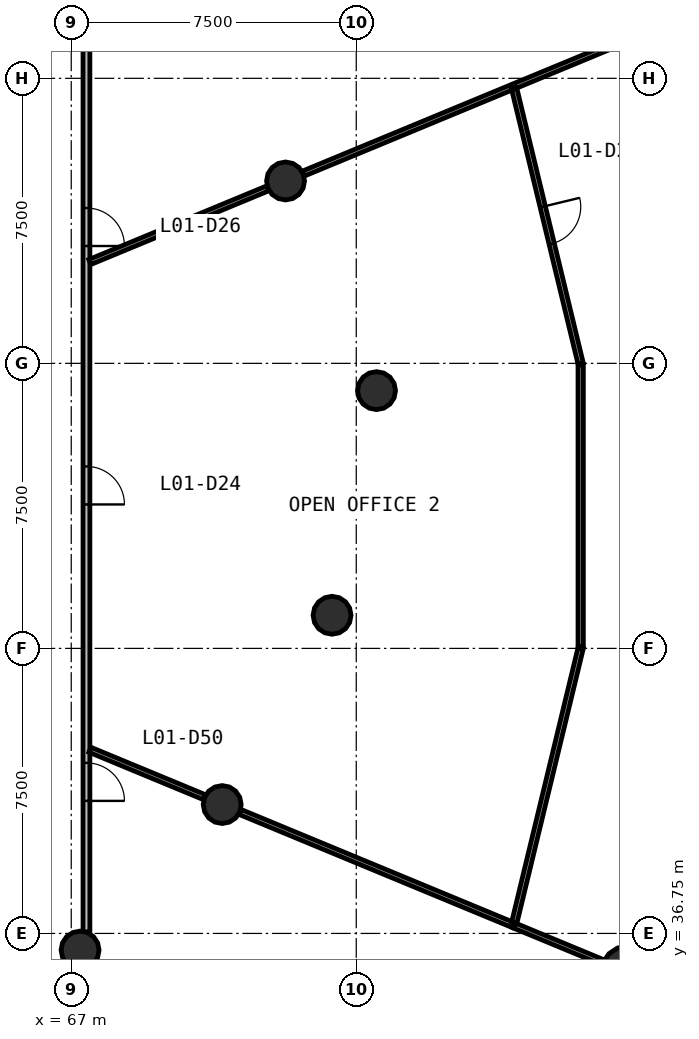
"""IFC4 building model, lengths in metres.
Left out: names, types, materials, properties, quantities, classifications, styles, units other than length and angle.
Written with IfcOpenShell. Run it as: python <this file> out.ifc"""

import sys

from ifc_helpers import new_model, si_unit, direction, frame, frame_2d, origin, origin_2d, place, context, subcontext, project, spatial, rectangle, circle, extrude, source, transform, mapped, element, fill, save


model = new_model("IFC4")
c1 = context("Model", 3, precision=1e-05, world=origin(), true_north=direction((0.0, 1.0)))
c2 = subcontext(c1, "Body", "Model", "MODEL_VIEW")
j1 = project(units=[si_unit("LENGTHUNIT", "METRE"), si_unit("PLANEANGLEUNIT", "RADIAN")], contexts=[c1])
p1 = place(None, origin())
s1 = spatial("IfcSite", under=j1, at=p1, CompositionType="ELEMENT")
p2 = place(p1, origin())
s2 = spatial("IfcBuilding", under=s1, at=p2, CompositionType="ELEMENT")
p3 = place(p2, frame((0.0, 0.0, 5.0)))
s3 = spatial("IfcBuildingStorey", under=s2, at=p3, CompositionType="ELEMENT", Elevation=5.0)
m1 = source(origin(), c2, "Body", "SweptSolid", [
    extrude(circle(Radius=0.7, at=origin_2d()), origin(), (0.0, 0.0, 1.0), 4.4),
])
p4 = place(p3, frame((81.645, 35.721, 0.0), z_axis=(0.0, 0.0, 1.0), x_axis=(1.0, 0.0, 0.0)))
e1 = element("IfcColumn", 1, at=p4, inside=s3, PredefinedType="COLUMN", context=c2, shape_type="MappedRepresentation", body=[
    mapped(m1, transform((0.0, 0.0, 0.0), scale=1.0)),
])
m2 = source(origin(), c2, "Body", "SweptSolid", [
    extrude(circle(Radius=0.5, at=origin_2d()), origin(), (0.0, 0.0, 1.0), 4.4),
])
for number, where, z_axis, x_axis in (
    (2, (75.034, 51.032, 0.0), (0.0, 0.0, 1.0), (1.0, 0.0, 0.0)),
    (3, (72.639, 56.549, 0.0), (0.0, 0.0, 1.0), (1.0, 0.0, 0.0)),
    (4, (67.232, 36.312, 0.0), (0.0, 0.0, 1.0), (1.0, 0.0, 0.0)),
    (5, (70.972, 40.141, 0.0), (0.0, 0.0, 1.0), (1.0, 0.0, 0.0)),
    (6, (73.863, 45.122, 0.0), (0.0, 0.0, 1.0), (1.0, 0.0, 0.0)),
):
    element("IfcColumn", number, at=place(p3, frame(where, z_axis=z_axis, x_axis=x_axis)), inside=s3, PredefinedType="COLUMN", context=c2, shape_type="MappedRepresentation", body=[
        mapped(m2, transform((0.0, 0.0, 0.0), scale=1.0)),
    ])
p5 = place(p3, frame((67.4, 60.37, 0.0), z_axis=(0.0, 0.0, 1.0), x_axis=(0.0, -1.0, 0.0)))
e7 = element("IfcWall", 7, at=p5, inside=s3, PredefinedType="PARTITIONING", context=c2, shape_type="SweptSolid", body=[
    extrude(rectangle(XDim=23.583, YDim=0.18, at=frame_2d((11.791, 0.0))), origin(), (0.0, 0.0, 1.0), 3.25),
])
p6 = place(p5, frame((11.333, 0.0, 0.0)))
e8 = element("IfcOpeningElement", 8, at=p6, cuts=e7, PredefinedType="OPENING", context=c2, shape_type="SweptSolid", body=[
    extrude(rectangle(XDim=1.0, YDim=2.1, at=frame_2d((0.5, 1.05))), frame((0.0, 0.1, 0.0), z_axis=(0.0, -1.0, 0.0), x_axis=(1.0, 0.0, 0.0)), (0.0, 0.0, 1.0), 0.2),
])
p7 = place(p5, frame((4.532, 0.0, 0.0)))
e9 = element("IfcOpeningElement", 9, at=p7, cuts=e7, PredefinedType="OPENING", context=c2, shape_type="SweptSolid", body=[
    extrude(rectangle(XDim=1.0, YDim=2.1, at=frame_2d((0.5, 1.05))), frame((0.0, 0.1, 0.0), z_axis=(0.0, -1.0, 0.0), x_axis=(1.0, 0.0, 0.0)), (0.0, 0.0, 1.0), 0.2),
])
p8 = place(p5, frame((19.133, 0.0, 0.0)))
e10 = element("IfcOpeningElement", 10, at=p8, cuts=e7, PredefinedType="OPENING", context=c2, shape_type="SweptSolid", body=[
    extrude(rectangle(XDim=1.0, YDim=2.1, at=frame_2d((0.5, 1.05))), frame((0.0, 0.1, 0.0), z_axis=(0.0, -1.0, 0.0), x_axis=(1.0, 0.0, 0.0)), (0.0, 0.0, 1.0), 0.2),
])
p9 = place(p3, frame((71.439, 39.948, 0.0), z_axis=(0.0, 0.0, 1.0), x_axis=(0.923876369205, -0.382691069173, 0.0)))
e11 = element("IfcWall", 11, at=p9, inside=s3, PredefinedType="PARTITIONING", context=c2, shape_type="SweptSolid", body=[
    extrude(rectangle(XDim=7.796, YDim=0.14, at=frame_2d((3.898, 0.0))), origin(), (0.0, 0.0, 1.0), 3.25),
])
p10 = place(p3, frame((78.642, 59.035, 0.0), z_axis=(0.0, 0.0, 1.0), x_axis=(0.235066566732, -0.971979274061, 0.0)))
e12 = element("IfcWall", 12, at=p10, inside=s3, PredefinedType="PARTITIONING", context=c2, shape_type="SweptSolid", body=[
    extrude(rectangle(XDim=7.506, YDim=0.14, at=frame_2d((3.753, 0.0))), origin(), (0.0, 0.0, 1.0), 3.25),
])
p11 = place(p10, frame((3.256, 0.0, 0.0)))
e13 = element("IfcOpeningElement", 13, at=p11, cuts=e12, PredefinedType="OPENING", context=c2, shape_type="SweptSolid", body=[
    extrude(rectangle(XDim=1.0, YDim=2.1, at=frame_2d((0.5, 1.05))), frame((0.0, 0.08, 0.0), z_axis=(0.0, -1.0, 0.0), x_axis=(1.0, 0.0, 0.0)), (0.0, 0.0, 1.0), 0.16),
])
p12 = place(p3, frame((78.658, 37.034, 0.0), z_axis=(0.0, 0.0, 1.0), x_axis=(0.235080266969, 0.97197596065, 0.0)))
e14 = element("IfcWall", 14, at=p12, inside=s3, PredefinedType="PARTITIONING", context=c2, shape_type="SweptSolid", body=[
    extrude(rectangle(XDim=7.435, YDim=0.14, at=frame_2d((3.717, 0.0))), origin(), (0.0, 0.0, 1.0), 3.25),
])
p13 = place(p3, frame((80.406, 44.29, 0.0), z_axis=(0.0, 0.0, 1.0), x_axis=(0.0, 1.0, 0.0)))
e15 = element("IfcWall", 15, at=p13, inside=s3, PredefinedType="PARTITIONING", context=c2, shape_type="SweptSolid", body=[
    extrude(rectangle(XDim=7.419, YDim=0.14, at=frame_2d((3.71, 0.0))), origin(), (0.0, 0.0, 1.0), 3.25),
])
p14 = place(p3, frame((73.106, 56.742, 0.0), z_axis=(0.0, 0.0, 1.0), x_axis=(0.923863045068, 0.382723234148, 0.0)))
e16 = element("IfcWall", 16, at=p14, inside=s3, PredefinedType="PARTITIONING", context=c2, shape_type="SweptSolid", body=[
    extrude(rectangle(XDim=5.921, YDim=0.14, at=frame_2d((2.96, 0.0))), origin(), (0.0, 0.0, 1.0), 3.25),
])
p15 = place(p3, frame((78.669, 59.047, 0.0), z_axis=(0.0, 0.0, 1.0), x_axis=(0.923891330959, 0.382654947151, 0.0)))
e17 = element("IfcWall", 17, at=p15, inside=s3, PredefinedType="PARTITIONING", context=c2, shape_type="SweptSolid", body=[
    extrude(rectangle(XDim=5.334, YDim=0.14, at=frame_2d((2.667, 0.0))), origin(), (0.0, 0.0, 1.0), 3.25),
])
p16 = place(p3, frame((67.49, 54.416, 0.0), z_axis=(0.0, 0.0, 1.0), x_axis=(0.923890025086, 0.382658100067, 0.0)))
e18 = element("IfcWall", 18, at=p16, inside=s3, PredefinedType="PARTITIONING", context=c2, shape_type="SweptSolid", body=[
    extrude(rectangle(XDim=5.068, YDim=0.14, at=frame_2d((2.534, 0.0))), origin(), (0.0, 0.0, 1.0), 3.25),
])
p17 = place(p3, frame((67.49, 41.584, 0.0), z_axis=(0.0, 0.0, 1.0), x_axis=(0.923911109142, -0.382607190737, 0.0)))
e19 = element("IfcWall", 19, at=p17, inside=s3, PredefinedType="PARTITIONING", context=c2, shape_type="SweptSolid", body=[
    extrude(rectangle(XDim=3.264, YDim=0.14, at=frame_2d((1.632, 0.0))), origin(), (0.0, 0.0, 1.0), 3.25),
])
p18 = place(p3, frame((78.669, 36.953, 0.0), z_axis=(0.0, 0.0, 1.0), x_axis=(0.923876063287, -0.382691807705, 0.0)))
e20 = element("IfcWall", 20, at=p18, inside=s3, PredefinedType="PARTITIONING", context=c2, shape_type="SweptSolid", body=[
    extrude(rectangle(XDim=2.515, YDim=0.14, at=frame_2d((1.258, 0.0))), origin(), (0.0, 0.0, 1.0), 3.25),
])
m3 = source(origin(), c2, "Body", "SweptSolid", [
    extrude(rectangle(XDim=1.0, YDim=2.1, at=frame_2d((0.5, 1.05))), frame((0.0, 0.025, 0.0), z_axis=(0.0, -1.0, 0.0), x_axis=(1.0, 0.0, 0.0)), (0.0, 0.0, 1.0), 0.05),
])
p19 = place(p6, origin())
e21 = element("IfcDoor", 21, at=p19, inside=s3, OperationType="SINGLE_SWING_RIGHT", PredefinedType="DOOR", context=c2, shape_type="MappedRepresentation", body=[
    mapped(m3, transform((0.0, 0.0, 0.0), scale=1.0)),
])
fill(e8, e21)
p20 = place(p11, origin())
e22 = element("IfcDoor", 22, at=p20, inside=s3, OperationType="SINGLE_SWING_LEFT", PredefinedType="DOOR", context=c2, shape_type="MappedRepresentation", body=[
    mapped(m3, transform((0.0, 0.0, 0.0), scale=1.0)),
])
fill(e13, e22)
p21 = place(p7, origin())
e23 = element("IfcDoor", 23, at=p21, inside=s3, OperationType="SINGLE_SWING_RIGHT", PredefinedType="DOOR", context=c2, shape_type="MappedRepresentation", body=[
    mapped(m3, transform((0.0, 0.0, 0.0), scale=1.0)),
])
fill(e9, e23)
p22 = place(p8, origin())
e24 = element("IfcDoor", 24, at=p22, inside=s3, OperationType="SINGLE_SWING_RIGHT", PredefinedType="DOOR", context=c2, shape_type="MappedRepresentation", body=[
    mapped(m3, transform((0.0, 0.0, 0.0), scale=1.0)),
])
fill(e10, e24)
save(model, sys.argv[1])
